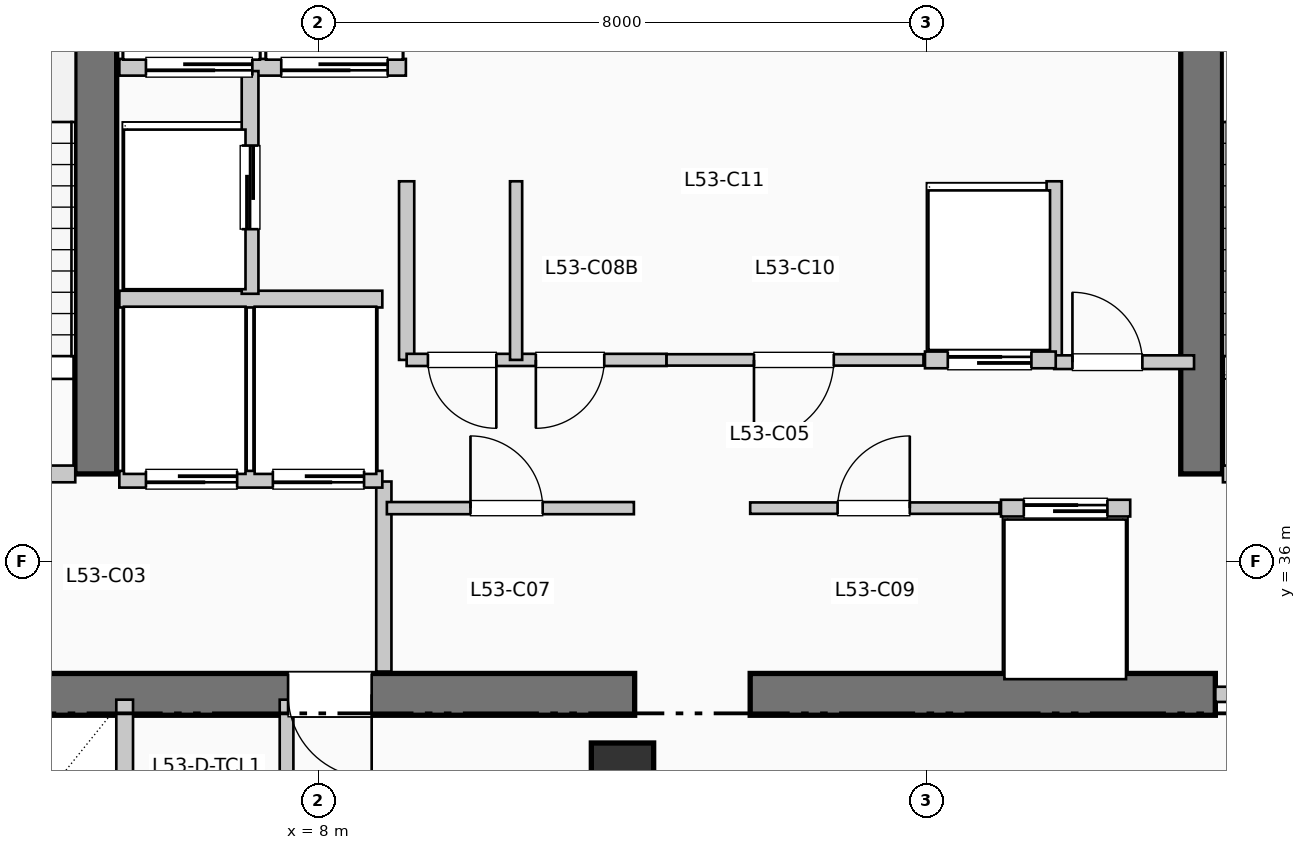
"""IFC4 building model, lengths in metres.
Left out: names, types, materials, properties, quantities, classifications, styles, units other than length and angle.
Written with IfcOpenShell. Run it as: python <this file> out.ifc"""

import sys

from ifc_helpers import new_model, si_unit, direction, frame, frame_2d, origin, origin_2d, place, context, subcontext, project, spatial, rectangle, extrude, element, fill, save


model = new_model("IFC4")
c1 = context("Model", 3, precision=1e-05, world=origin(), true_north=direction((0.0, 1.0)))
c2 = subcontext(c1, "Body", "Model", "MODEL_VIEW")
j1 = project(units=[si_unit("LENGTHUNIT", "METRE"), si_unit("PLANEANGLEUNIT", "RADIAN")], contexts=[c1])
p1 = place(None, origin())
s1 = spatial("IfcSite", under=j1, at=p1, CompositionType="ELEMENT")
p2 = place(p1, origin())
s2 = spatial("IfcBuilding", under=s1, at=p2, CompositionType="ELEMENT")
p3 = place(p2, frame((0.0, 0.0, 219.78)))
s3 = spatial("IfcBuildingStorey", under=s2, at=p3, CompositionType="ELEMENT", Elevation=219.78)
p4 = place(p3, frame((1.45, 34.25, 0.0), z_axis=(0.0, 0.0, 1.0), x_axis=(1.0, 0.0, 0.0)))
e1 = element("IfcWall", 1, at=p4, inside=s3, PredefinedType="SHEAR", context=c2, shape_type="SweptSolid", body=[
    extrude(rectangle(XDim=10.71, YDim=0.55, at=frame_2d((5.355, 0.0))), origin(), (0.0, 0.0, 1.0), 3.96),
])
p5 = place(p4, frame((7.25, 0.0, 0.0), z_axis=(0.0, 0.0, 1.0), x_axis=(-1.0, 0.0, 0.0)))
e2 = element("IfcOpeningElement", 2, at=p5, cuts=e1, PredefinedType="OPENING", context=c2, shape_type="SweptSolid", body=[
    extrude(rectangle(XDim=1.1, YDim=2.15, at=frame_2d((0.55, 1.075))), frame((0.0, 0.285, 0.0), z_axis=(0.0, -1.0, 0.0), x_axis=(1.0, 0.0, 0.0)), (0.0, 0.0, 1.0), 0.57),
])
p6 = place(p3, frame((13.68, 34.25, 0.0), z_axis=(0.0, 0.0, 1.0), x_axis=(1.0, 0.0, 0.0)))
e3 = element("IfcWall", 3, at=p6, inside=s3, PredefinedType="SHEAR", context=c2, shape_type="SweptSolid", body=[
    extrude(rectangle(XDim=6.12, YDim=0.55, at=frame_2d((3.06, 0.0))), origin(), (0.0, 0.0, 1.0), 3.96),
])
for number, where, z_axis, x_axis in (
    (4, (5.07, 37.15, 0.0), (0.0, 0.0, 1.0), (0.0, 1.0, 0.0)),
    (5, (19.62, 37.15, 0.0), (0.0, 0.0, 1.0), (0.0, 1.0, 0.0)),
):
    element("IfcWall", number, at=place(p3, frame(where, z_axis=z_axis, x_axis=x_axis)), inside=s3, PredefinedType="SHEAR", context=c2, shape_type="SweptSolid", body=[
        extrude(rectangle(XDim=7.89, YDim=0.55, at=frame_2d((3.945, 0.0))), origin(), (0.0, 0.0, 1.0), 3.96),
    ])
p7 = place(p3, frame((12.0, 33.2, 0.0), z_axis=(0.0, 0.0, 1.0), x_axis=(1.0, 0.0, 0.0)))
e6 = element("IfcColumn", 6, at=p7, inside=s3, PredefinedType="COLUMN", context=c2, shape_type="SweptSolid", body=[
    extrude(rectangle(XDim=0.82, YDim=0.82, at=origin_2d()), origin(), (0.0, 0.0, 1.0), 3.96),
])
p8 = place(p3, frame((1.65, 37.15, 0.0), z_axis=(0.0, 0.0, 1.0), x_axis=(1.0, 0.0, 0.0)))
e7 = element("IfcWall", 7, at=p8, inside=s3, PredefinedType="PARTITIONING", context=c2, shape_type="SweptSolid", body=[
    extrude(rectangle(XDim=3.15, YDim=0.22, at=frame_2d((1.575, 0.0))), origin(), (0.0, 0.0, 1.0), 3.71),
])
p9 = place(p8, frame((2.05, 0.0, 0.0), z_axis=(0.0, 0.0, 1.0), x_axis=(-1.0, 0.0, 0.0)))
e8 = element("IfcOpeningElement", 8, at=p9, cuts=e7, PredefinedType="OPENING", context=c2, shape_type="SweptSolid", body=[
    extrude(rectangle(XDim=1.05, YDim=2.15, at=frame_2d((0.525, 1.075))), frame((0.0, 0.12, 0.0), z_axis=(0.0, -1.0, 0.0), x_axis=(1.0, 0.0, 0.0)), (0.0, 0.0, 1.0), 0.24),
])
p10 = place(p3, frame((8.86, 34.55, 0.0), z_axis=(0.0, 0.0, 1.0), x_axis=(0.0, 1.0, 0.0)))
e9 = element("IfcWall", 9, at=p10, inside=s3, PredefinedType="PARTITIONING", context=c2, shape_type="SweptSolid", body=[
    extrude(rectangle(XDim=2.5, YDim=0.2, at=frame_2d((1.25, 0.0))), origin(), (0.0, 0.0, 1.0), 3.71),
])
p11 = place(p3, frame((19.9, 37.15, 0.0), z_axis=(0.0, 0.0, 1.0), x_axis=(1.0, 0.0, 0.0)))
e10 = element("IfcWall", 10, at=p11, inside=s3, PredefinedType="PARTITIONING", context=c2, shape_type="SweptSolid", body=[
    extrude(rectangle(XDim=3.15, YDim=0.22, at=frame_2d((1.575, 0.0))), origin(), (0.0, 0.0, 1.0), 3.71),
])
p12 = place(p11, frame((2.05, 0.0, 0.0), z_axis=(0.0, 0.0, 1.0), x_axis=(-1.0, 0.0, 0.0)))
e11 = element("IfcOpeningElement", 11, at=p12, cuts=e10, PredefinedType="OPENING", context=c2, shape_type="SweptSolid", body=[
    extrude(rectangle(XDim=1.05, YDim=2.15, at=frame_2d((0.525, 1.075))), frame((0.0, 0.12, 0.0), z_axis=(0.0, -1.0, 0.0), x_axis=(1.0, 0.0, 0.0)), (0.0, 0.0, 1.0), 0.24),
])
p13 = place(p3, frame((19.8, 34.25, 0.0), z_axis=(0.0, 0.0, 1.0), x_axis=(1.0, 0.0, 0.0)))
e12 = element("IfcWall", 12, at=p13, inside=s3, PredefinedType="PARTITIONING", context=c2, shape_type="SweptSolid", body=[
    extrude(rectangle(XDim=3.25, YDim=0.2, at=frame_2d((1.625, 0.0))), origin(), (0.0, 0.0, 1.0), 3.71),
])
p14 = place(p13, frame((2.15, 0.0, 0.0), z_axis=(0.0, 0.0, 1.0), x_axis=(-1.0, 0.0, 0.0)))
e13 = element("IfcOpeningElement", 13, at=p14, cuts=e12, PredefinedType="OPENING", context=c2, shape_type="SweptSolid", body=[
    extrude(rectangle(XDim=1.1, YDim=2.15, at=frame_2d((0.55, 1.075))), frame((0.0, 0.11, 0.0), z_axis=(0.0, -1.0, 0.0), x_axis=(1.0, 0.0, 0.0)), (0.0, 0.0, 1.0), 0.22),
])
p15 = place(p3, frame((5.38, 37.08, 0.0), z_axis=(0.0, 0.0, 1.0), x_axis=(1.0, 0.0, 0.0)))
e14 = element("IfcWall", 14, at=p15, inside=s3, PredefinedType="PARTITIONING", context=c2, shape_type="SweptSolid", body=[
    extrude(rectangle(XDim=3.46, YDim=0.22, at=frame_2d((1.73, 0.0))), origin(), (0.0, 0.0, 1.0), 3.71),
])
p16 = place(p15, frame((1.55, 0.0, 0.0), z_axis=(0.0, 0.0, 1.0), x_axis=(-1.0, 0.0, 0.0)))
e15 = element("IfcOpeningElement", 15, at=p16, cuts=e14, PredefinedType="OPENING", context=c2, shape_type="SweptSolid", body=[
    extrude(rectangle(XDim=1.2, YDim=2.2, at=frame_2d((0.6, 1.1))), frame((0.0, 0.12, 0.0), z_axis=(0.0, -1.0, 0.0), x_axis=(1.0, 0.0, 0.0)), (0.0, 0.0, 1.0), 0.24),
])
p17 = place(p15, frame((3.22, 0.0, 0.0), z_axis=(0.0, 0.0, 1.0), x_axis=(-1.0, 0.0, 0.0)))
e16 = element("IfcOpeningElement", 16, at=p17, cuts=e14, PredefinedType="OPENING", context=c2, shape_type="SweptSolid", body=[
    extrude(rectangle(XDim=1.2, YDim=2.2, at=frame_2d((0.6, 1.1))), frame((0.0, 0.12, 0.0), z_axis=(0.0, -1.0, 0.0), x_axis=(1.0, 0.0, 0.0)), (0.0, 0.0, 1.0), 0.24),
])
p18 = place(p3, frame((5.38, 39.45, 0.0), z_axis=(0.0, 0.0, 1.0), x_axis=(1.0, 0.0, 0.0)))
e17 = element("IfcWall", 17, at=p18, inside=s3, PredefinedType="PARTITIONING", context=c2, shape_type="SweptSolid", body=[
    extrude(rectangle(XDim=3.46, YDim=0.22, at=frame_2d((1.73, 0.0))), origin(), (0.0, 0.0, 1.0), 3.71),
])
p19 = place(p3, frame((5.38, 42.5, 0.0), z_axis=(0.0, 0.0, 1.0), x_axis=(1.0, 0.0, 0.0)))
e18 = element("IfcWall", 18, at=p19, inside=s3, PredefinedType="PARTITIONING", context=c2, shape_type="SweptSolid", body=[
    extrude(rectangle(XDim=3.77, YDim=0.22, at=frame_2d((1.885, 0.0))), origin(), (0.0, 0.0, 1.0), 3.71),
])
p20 = place(p19, frame((1.75, 0.0, 0.0), z_axis=(0.0, 0.0, 1.0), x_axis=(-1.0, 0.0, 0.0)))
e19 = element("IfcOpeningElement", 19, at=p20, cuts=e18, PredefinedType="OPENING", context=c2, shape_type="SweptSolid", body=[
    extrude(rectangle(XDim=1.4, YDim=2.2, at=frame_2d((0.7, 1.1))), frame((0.0, 0.12, 0.0), z_axis=(0.0, -1.0, 0.0), x_axis=(1.0, 0.0, 0.0)), (0.0, 0.0, 1.0), 0.24),
])
p21 = place(p19, frame((3.53, 0.0, 0.0), z_axis=(0.0, 0.0, 1.0), x_axis=(-1.0, 0.0, 0.0)))
e20 = element("IfcOpeningElement", 20, at=p21, cuts=e18, PredefinedType="OPENING", context=c2, shape_type="SweptSolid", body=[
    extrude(rectangle(XDim=1.4, YDim=2.2, at=frame_2d((0.7, 1.1))), frame((0.0, 0.12, 0.0), z_axis=(0.0, -1.0, 0.0), x_axis=(1.0, 0.0, 0.0)), (0.0, 0.0, 1.0), 0.24),
])
p22 = place(p3, frame((7.1, 39.52, 0.0), z_axis=(0.0, 0.0, 1.0), x_axis=(0.0, 1.0, 0.0)))
e21 = element("IfcWall", 21, at=p22, inside=s3, PredefinedType="PARTITIONING", context=c2, shape_type="SweptSolid", body=[
    extrude(rectangle(XDim=2.93, YDim=0.22, at=frame_2d((1.465, 0.0))), origin(), (0.0, 0.0, 1.0), 3.71),
])
p23 = place(p22, frame((0.85, 0.0, 0.0)))
e22 = element("IfcOpeningElement", 22, at=p23, cuts=e21, PredefinedType="OPENING", context=c2, shape_type="SweptSolid", body=[
    extrude(rectangle(XDim=1.1, YDim=2.2, at=frame_2d((0.55, 1.1))), frame((0.0, 0.12, 0.0), z_axis=(0.0, -1.0, 0.0), x_axis=(1.0, 0.0, 0.0)), (0.0, 0.0, 1.0), 0.24),
])
p24 = place(p3, frame((5.45, 31.8, 0.0), z_axis=(0.0, 0.0, 1.0), x_axis=(0.0, 1.0, 0.0)))
e23 = element("IfcWall", 23, at=p24, inside=s3, PredefinedType="PARTITIONING", context=c2, shape_type="SweptSolid", body=[
    extrude(rectangle(XDim=2.38, YDim=0.22, at=frame_2d((1.19, 0.0))), origin(), (0.0, 0.0, 1.0), 3.71),
])
for number, where, z_axis, x_axis in (
    (24, (9.16, 38.65, 0.0), (0.0, 0.0, 1.0), (0.0, 1.0, 0.0)),
    (25, (17.68, 38.65, 0.0), (0.0, 0.0, 1.0), (0.0, 1.0, 0.0)),
):
    element("IfcWall", number, at=place(p3, frame(where, z_axis=z_axis, x_axis=x_axis)), inside=s3, PredefinedType="PARTITIONING", context=c2, shape_type="SweptSolid", body=[
        extrude(rectangle(XDim=2.35, YDim=0.2, at=frame_2d((1.175, 0.0))), origin(), (0.0, 0.0, 1.0), 3.71),
    ])
p25 = place(p3, frame((17.68, 38.62, 0.0), z_axis=(0.0, 0.0, 1.0), x_axis=(1.0, 0.0, 0.0)))
e26 = element("IfcWall", 26, at=p25, inside=s3, PredefinedType="PARTITIONING", context=c2, shape_type="SweptSolid", body=[
    extrude(rectangle(XDim=1.84, YDim=0.18, at=frame_2d((0.92, 0.0))), origin(), (0.0, 0.0, 1.0), 3.71),
])
p26 = place(p25, frame((0.24, 0.0, 0.0)))
e27 = element("IfcOpeningElement", 27, at=p26, cuts=e26, PredefinedType="OPENING", context=c2, shape_type="SweptSolid", body=[
    extrude(rectangle(XDim=0.92, YDim=2.1, at=frame_2d((0.46, 1.05))), frame((0.0, 0.1, 0.0), z_axis=(0.0, -1.0, 0.0), x_axis=(1.0, 0.0, 0.0)), (0.0, 0.0, 1.0), 0.2),
])
p27 = place(p3, frame((7.58, 31.82, 0.0), z_axis=(0.0, 0.0, 1.0), x_axis=(0.0, 1.0, 0.0)))
e28 = element("IfcWall", 28, at=p27, inside=s3, PredefinedType="PLUMBINGWALL", context=c2, shape_type="SweptSolid", body=[
    extrude(rectangle(XDim=2.36, YDim=0.18, at=frame_2d((1.18, 0.0))), origin(), (0.0, 0.0, 1.0), 3.71),
])
p28 = place(p3, frame((8.9, 36.7, 0.0), z_axis=(0.0, 0.0, 1.0), x_axis=(1.0, 0.0, 0.0)))
e29 = element("IfcWall", 29, at=p28, inside=s3, PredefinedType="PARTITIONING", context=c2, shape_type="SweptSolid", body=[
    extrude(rectangle(XDim=3.25, YDim=0.16, at=frame_2d((1.625, 0.0))), origin(), (0.0, 0.0, 1.0), 3.71),
])
p29 = place(p28, frame((1.1, 0.0, 0.0)))
e30 = element("IfcOpeningElement", 30, at=p29, cuts=e29, PredefinedType="OPENING", context=c2, shape_type="SweptSolid", body=[
    extrude(rectangle(XDim=0.95, YDim=2.15, at=frame_2d((0.475, 1.075))), frame((0.0, 0.09, 0.0), z_axis=(0.0, -1.0, 0.0), x_axis=(1.0, 0.0, 0.0)), (0.0, 0.0, 1.0), 0.18),
])
p30 = place(p3, frame((9.16, 38.65, 0.0), z_axis=(0.0, 0.0, 1.0), x_axis=(1.0, 0.0, 0.0)))
e31 = element("IfcWall", 31, at=p30, inside=s3, PredefinedType="PARTITIONING", context=c2, shape_type="SweptSolid", body=[
    extrude(rectangle(XDim=3.42, YDim=0.16, at=frame_2d((1.71, 0.0))), origin(), (0.0, 0.0, 1.0), 3.71),
])
p31 = place(p30, frame((1.18, 0.0, 0.0), z_axis=(0.0, 0.0, 1.0), x_axis=(-1.0, 0.0, 0.0)))
e32 = element("IfcOpeningElement", 32, at=p31, cuts=e31, PredefinedType="OPENING", context=c2, shape_type="SweptSolid", body=[
    extrude(rectangle(XDim=0.9, YDim=2.15, at=frame_2d((0.45, 1.075))), frame((0.0, 0.09, 0.0), z_axis=(0.0, -1.0, 0.0), x_axis=(1.0, 0.0, 0.0)), (0.0, 0.0, 1.0), 0.18),
])
p32 = place(p30, frame((2.6, 0.0, 0.0), z_axis=(0.0, 0.0, 1.0), x_axis=(-1.0, 0.0, 0.0)))
e33 = element("IfcOpeningElement", 33, at=p32, cuts=e31, PredefinedType="OPENING", context=c2, shape_type="SweptSolid", body=[
    extrude(rectangle(XDim=0.9, YDim=2.15, at=frame_2d((0.45, 1.075))), frame((0.0, 0.09, 0.0), z_axis=(0.0, -1.0, 0.0), x_axis=(1.0, 0.0, 0.0)), (0.0, 0.0, 1.0), 0.18),
])
p33 = place(p3, frame((10.6, 38.65, 0.0), z_axis=(0.0, 0.0, 1.0), x_axis=(0.0, 1.0, 0.0)))
e34 = element("IfcWall", 34, at=p33, inside=s3, PredefinedType="PARTITIONING", context=c2, shape_type="SweptSolid", body=[
    extrude(rectangle(XDim=2.35, YDim=0.16, at=frame_2d((1.175, 0.0))), origin(), (0.0, 0.0, 1.0), 3.71),
])
p34 = place(p3, frame((13.68, 36.7, 0.0), z_axis=(0.0, 0.0, 1.0), x_axis=(1.0, 0.0, 0.0)))
e35 = element("IfcWall", 35, at=p34, inside=s3, PredefinedType="PARTITIONING", context=c2, shape_type="SweptSolid", body=[
    extrude(rectangle(XDim=3.28, YDim=0.15, at=frame_2d((1.64, 0.0))), origin(), (0.0, 0.0, 1.0), 3.71),
])
p35 = place(p34, frame((1.15, 0.0, 0.0)))
e36 = element("IfcOpeningElement", 36, at=p35, cuts=e35, PredefinedType="OPENING", context=c2, shape_type="SweptSolid", body=[
    extrude(rectangle(XDim=0.95, YDim=2.15, at=frame_2d((0.475, 1.075))), frame((0.0, 0.085, 0.0), z_axis=(0.0, -1.0, 0.0), x_axis=(1.0, 0.0, 0.0)), (0.0, 0.0, 1.0), 0.17),
])
p36 = place(p3, frame((12.58, 38.65, 0.0), z_axis=(0.0, 0.0, 1.0), x_axis=(1.0, 0.0, 0.0)))
e37 = element("IfcWall", 37, at=p36, inside=s3, PredefinedType="PARTITIONING", context=c2, shape_type="SweptSolid", body=[
    extrude(rectangle(XDim=3.38, YDim=0.15, at=frame_2d((1.69, 0.0))), origin(), (0.0, 0.0, 1.0), 3.71),
])
p37 = place(p36, frame((2.2, 0.0, 0.0), z_axis=(0.0, 0.0, 1.0), x_axis=(-1.0, 0.0, 0.0)))
e38 = element("IfcOpeningElement", 38, at=p37, cuts=e37, PredefinedType="OPENING", context=c2, shape_type="SweptSolid", body=[
    extrude(rectangle(XDim=1.05, YDim=2.15, at=frame_2d((0.525, 1.075))), frame((0.0, 0.085, 0.0), z_axis=(0.0, -1.0, 0.0), x_axis=(1.0, 0.0, 0.0)), (0.0, 0.0, 1.0), 0.17),
])
p38 = place(p3, frame((16.98, 36.7, 0.0), z_axis=(0.0, 0.0, 1.0), x_axis=(1.0, 0.0, 0.0)))
e39 = element("IfcWall", 39, at=p38, inside=s3, PredefinedType="PARTITIONING", context=c2, shape_type="SweptSolid", body=[
    extrude(rectangle(XDim=1.7, YDim=0.22, at=frame_2d((0.85, 0.0))), origin(), (0.0, 0.0, 1.0), 3.71),
])
p39 = place(p38, frame((0.3, 0.0, 0.0)))
e40 = element("IfcOpeningElement", 40, at=p39, cuts=e39, PredefinedType="OPENING", context=c2, shape_type="SweptSolid", body=[
    extrude(rectangle(XDim=1.1, YDim=2.2, at=frame_2d((0.55, 1.1))), frame((0.0, 0.12, 0.0), z_axis=(0.0, -1.0, 0.0), x_axis=(1.0, 0.0, 0.0)), (0.0, 0.0, 1.0), 0.24),
])
p40 = place(p3, frame((15.98, 38.65, 0.0), z_axis=(0.0, 0.0, 1.0), x_axis=(1.0, 0.0, 0.0)))
e41 = element("IfcWall", 41, at=p40, inside=s3, PredefinedType="PARTITIONING", context=c2, shape_type="SweptSolid", body=[
    extrude(rectangle(XDim=1.72, YDim=0.22, at=frame_2d((0.86, 0.0))), origin(), (0.0, 0.0, 1.0), 3.71),
])
p41 = place(p40, frame((0.3, 0.0, 0.0)))
e42 = element("IfcOpeningElement", 42, at=p41, cuts=e41, PredefinedType="OPENING", context=c2, shape_type="SweptSolid", body=[
    extrude(rectangle(XDim=1.1, YDim=2.2, at=frame_2d((0.55, 1.1))), frame((0.0, 0.12, 0.0), z_axis=(0.0, -1.0, 0.0), x_axis=(1.0, 0.0, 0.0)), (0.0, 0.0, 1.0), 0.24),
])
p42 = place(p5, origin())
e43 = element("IfcDoor", 43, at=p42, inside=s3, OperationType="SINGLE_SWING_RIGHT", PredefinedType="DOOR", context=c2, shape_type="SweptSolid", body=[
    extrude(rectangle(XDim=1.1, YDim=2.15, at=frame_2d((0.55, 1.075))), frame((0.0, 0.025, 0.0), z_axis=(0.0, -1.0, 0.0), x_axis=(1.0, 0.0, 0.0)), (0.0, 0.0, 1.0), 0.05),
])
fill(e2, e43)
p43 = place(p16, origin())
e44 = element("IfcDoor", 44, at=p43, inside=s3, OperationType="SLIDING_TO_RIGHT", PredefinedType="DOOR", context=c2, shape_type="SweptSolid", body=[
    extrude(rectangle(XDim=1.2, YDim=2.2, at=frame_2d((0.6, 1.1))), frame((0.0, 0.025, 0.0), z_axis=(0.0, -1.0, 0.0), x_axis=(1.0, 0.0, 0.0)), (0.0, 0.0, 1.0), 0.05),
])
fill(e15, e44)
p44 = place(p17, origin())
e45 = element("IfcDoor", 45, at=p44, inside=s3, OperationType="SLIDING_TO_RIGHT", PredefinedType="DOOR", context=c2, shape_type="SweptSolid", body=[
    extrude(rectangle(XDim=1.2, YDim=2.2, at=frame_2d((0.6, 1.1))), frame((0.0, 0.025, 0.0), z_axis=(0.0, -1.0, 0.0), x_axis=(1.0, 0.0, 0.0)), (0.0, 0.0, 1.0), 0.05),
])
fill(e16, e45)
p45 = place(p20, origin())
e46 = element("IfcDoor", 46, at=p45, inside=s3, OperationType="SLIDING_TO_LEFT", PredefinedType="DOOR", context=c2, shape_type="SweptSolid", body=[
    extrude(rectangle(XDim=1.4, YDim=2.2, at=frame_2d((0.7, 1.1))), frame((0.0, 0.025, 0.0), z_axis=(0.0, -1.0, 0.0), x_axis=(1.0, 0.0, 0.0)), (0.0, 0.0, 1.0), 0.05),
])
fill(e19, e46)
p46 = place(p21, origin())
e47 = element("IfcDoor", 47, at=p46, inside=s3, OperationType="SLIDING_TO_LEFT", PredefinedType="DOOR", context=c2, shape_type="SweptSolid", body=[
    extrude(rectangle(XDim=1.4, YDim=2.2, at=frame_2d((0.7, 1.1))), frame((0.0, 0.025, 0.0), z_axis=(0.0, -1.0, 0.0), x_axis=(1.0, 0.0, 0.0)), (0.0, 0.0, 1.0), 0.05),
])
fill(e20, e47)
p47 = place(p23, origin())
e48 = element("IfcDoor", 48, at=p47, inside=s3, OperationType="SLIDING_TO_LEFT", PredefinedType="DOOR", context=c2, shape_type="SweptSolid", body=[
    extrude(rectangle(XDim=1.1, YDim=2.2, at=frame_2d((0.55, 1.1))), frame((0.0, 0.025, 0.0), z_axis=(0.0, -1.0, 0.0), x_axis=(1.0, 0.0, 0.0)), (0.0, 0.0, 1.0), 0.05),
])
fill(e22, e48)
p48 = place(p26, origin())
e49 = element("IfcDoor", 49, at=p48, inside=s3, OperationType="SINGLE_SWING_LEFT", PredefinedType="DOOR", context=c2, shape_type="SweptSolid", body=[
    extrude(rectangle(XDim=0.92, YDim=2.1, at=frame_2d((0.46, 1.05))), frame((0.0, 0.025, 0.0), z_axis=(0.0, -1.0, 0.0), x_axis=(1.0, 0.0, 0.0)), (0.0, 0.0, 1.0), 0.05),
])
fill(e27, e49)
p49 = place(p29, origin())
e50 = element("IfcDoor", 50, at=p49, inside=s3, OperationType="SINGLE_SWING_LEFT", PredefinedType="DOOR", context=c2, shape_type="SweptSolid", body=[
    extrude(rectangle(XDim=0.95, YDim=2.15, at=frame_2d((0.475, 1.075))), frame((0.0, 0.025, 0.0), z_axis=(0.0, -1.0, 0.0), x_axis=(1.0, 0.0, 0.0)), (0.0, 0.0, 1.0), 0.05),
])
fill(e30, e50)
p50 = place(p31, origin())
e51 = element("IfcDoor", 51, at=p50, inside=s3, OperationType="SINGLE_SWING_RIGHT", PredefinedType="DOOR", context=c2, shape_type="SweptSolid", body=[
    extrude(rectangle(XDim=0.9, YDim=2.15, at=frame_2d((0.45, 1.075))), frame((0.0, 0.025, 0.0), z_axis=(0.0, -1.0, 0.0), x_axis=(1.0, 0.0, 0.0)), (0.0, 0.0, 1.0), 0.05),
])
fill(e32, e51)
p51 = place(p32, origin())
e52 = element("IfcDoor", 52, at=p51, inside=s3, OperationType="SINGLE_SWING_LEFT", PredefinedType="DOOR", context=c2, shape_type="SweptSolid", body=[
    extrude(rectangle(XDim=0.9, YDim=2.15, at=frame_2d((0.45, 1.075))), frame((0.0, 0.025, 0.0), z_axis=(0.0, -1.0, 0.0), x_axis=(1.0, 0.0, 0.0)), (0.0, 0.0, 1.0), 0.05),
])
fill(e33, e52)
p52 = place(p35, origin())
e53 = element("IfcDoor", 53, at=p52, inside=s3, OperationType="SINGLE_SWING_RIGHT", PredefinedType="DOOR", context=c2, shape_type="SweptSolid", body=[
    extrude(rectangle(XDim=0.95, YDim=2.15, at=frame_2d((0.475, 1.075))), frame((0.0, 0.025, 0.0), z_axis=(0.0, -1.0, 0.0), x_axis=(1.0, 0.0, 0.0)), (0.0, 0.0, 1.0), 0.05),
])
fill(e36, e53)
p53 = place(p37, origin())
e54 = element("IfcDoor", 54, at=p53, inside=s3, OperationType="SINGLE_SWING_LEFT", PredefinedType="DOOR", context=c2, shape_type="SweptSolid", body=[
    extrude(rectangle(XDim=1.05, YDim=2.15, at=frame_2d((0.525, 1.075))), frame((0.0, 0.025, 0.0), z_axis=(0.0, -1.0, 0.0), x_axis=(1.0, 0.0, 0.0)), (0.0, 0.0, 1.0), 0.05),
])
fill(e38, e54)
p54 = place(p39, origin())
e55 = element("IfcDoor", 55, at=p54, inside=s3, OperationType="SLIDING_TO_LEFT", PredefinedType="DOOR", context=c2, shape_type="SweptSolid", body=[
    extrude(rectangle(XDim=1.1, YDim=2.2, at=frame_2d((0.55, 1.1))), frame((0.0, 0.025, 0.0), z_axis=(0.0, -1.0, 0.0), x_axis=(1.0, 0.0, 0.0)), (0.0, 0.0, 1.0), 0.05),
])
fill(e40, e55)
p55 = place(p41, origin())
e56 = element("IfcDoor", 56, at=p55, inside=s3, OperationType="SLIDING_TO_LEFT", PredefinedType="DOOR", context=c2, shape_type="SweptSolid", body=[
    extrude(rectangle(XDim=1.1, YDim=2.2, at=frame_2d((0.55, 1.1))), frame((0.0, 0.025, 0.0), z_axis=(0.0, -1.0, 0.0), x_axis=(1.0, 0.0, 0.0)), (0.0, 0.0, 1.0), 0.05),
])
fill(e42, e56)
save(model, sys.argv[1])
